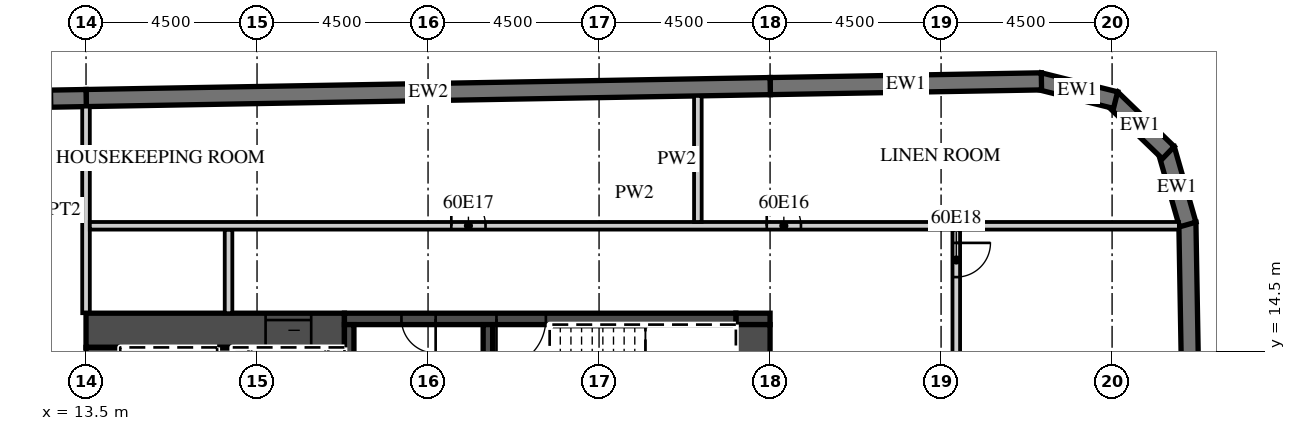
"""IFC4 building model, lengths in metres.
Left out: names, types, materials, properties, quantities, classifications, styles, units other than length and angle.
Written with IfcOpenShell. Run it as: python <this file> out.ifc"""

import sys

from ifc_helpers import new_model, si_unit, direction, frame, frame_2d, origin, place, context, subcontext, project, spatial, polyline, rectangle, outline, extrude, element, fill, save


model = new_model("IFC4")
c1 = context("Model", 3, precision=1e-05, world=origin(), true_north=direction((0.0, 1.0)))
c2 = subcontext(c1, "Body", "Model", "MODEL_VIEW")
j1 = project(units=[si_unit("LENGTHUNIT", "METRE"), si_unit("PLANEANGLEUNIT", "RADIAN")], contexts=[c1])
p1 = place(None, origin())
s1 = spatial("IfcSite", under=j1, at=p1, CompositionType="ELEMENT")
p2 = place(p1, origin())
s2 = spatial("IfcBuilding", under=s1, at=p2, CompositionType="ELEMENT")
p3 = place(p2, frame((0.0, 0.0, 244.1)))
s3 = spatial("IfcBuildingStorey", under=s2, at=p3, CompositionType="ELEMENT", Elevation=244.1)
p4 = place(p3, frame((43.057, -15.103, 0.0), z_axis=(0.0, 0.0, 1.0), x_axis=(-0.017452408953, 0.999847695112, 0.0)))
e1 = element("IfcWall", 1, at=p4, inside=s3, PredefinedType="SOLIDWALL", context=c2, shape_type="SweptSolid", body=[
    extrude(rectangle(XDim=33.0, YDim=0.45, at=frame_2d((16.5, 0.0))), origin(), (0.0, 0.0, 1.0), 3.02),
])
p5 = place(p3, frame((42.49, 17.833, 0.0), z_axis=(0.0, 0.0, 1.0), x_axis=(-0.275546368831, 0.961287781377, 0.0)))
e2 = element("IfcWall", 2, at=p5, inside=s3, PredefinedType="SOLIDWALL", context=c2, shape_type="SweptSolid", body=[
    extrude(outline(polyline([(0.0, -0.225), (2.071, -0.225), (1.95, 0.225), (0.121, 0.225), (0.0, -0.225)])), origin(), (0.0, 0.0, 1.0), 3.02),
])
p6 = place(p3, frame((41.979, 19.724, 0.0), z_axis=(0.0, 0.0, 1.0), x_axis=(-0.719379111448, 0.694617660308, 0.0)))
e3 = element("IfcWall", 3, at=p6, inside=s3, PredefinedType="SOLIDWALL", context=c2, shape_type="SweptSolid", body=[
    extrude(outline(polyline([(0.0, -0.225), (2.071, -0.225), (1.95, 0.225), (0.121, 0.225), (0.0, -0.225)])), origin(), (0.0, 0.0, 1.0), 3.02),
])
p7 = place(p3, frame((40.591, 21.106, 0.0), z_axis=(0.0, 0.0, 1.0), x_axis=(-0.970287979719, 0.241952963225, 0.0)))
e4 = element("IfcWall", 4, at=p7, inside=s3, PredefinedType="SOLIDWALL", context=c2, shape_type="SweptSolid", body=[
    extrude(outline(polyline([(0.0, -0.225), (2.071, -0.225), (1.95, 0.225), (0.121, 0.225), (0.0, -0.225)])), origin(), (0.0, 0.0, 1.0), 3.02),
])
p8 = place(p3, frame((38.641, 21.6, 0.0), z_axis=(0.0, 0.0, 1.0), x_axis=(-0.999847245074, -0.017478172627, 0.0)))
e5 = element("IfcWall", 5, at=p8, inside=s3, PredefinedType="SOLIDWALL", context=c2, shape_type="SweptSolid", body=[
    extrude(rectangle(XDim=7.138, YDim=0.45, at=frame_2d((3.569, 0.0))), origin(), (0.0, 0.0, 1.0), 3.02),
])
p9 = place(p3, frame((31.504, 21.476, 0.0), z_axis=(0.0, 0.0, 1.0), x_axis=(-0.999847677887, -0.017453395744, 0.0)))
e6 = element("IfcWall", 6, at=p9, inside=s3, PredefinedType="SOLIDWALL", context=c2, shape_type="SweptSolid", body=[
    extrude(rectangle(XDim=18.003, YDim=0.45, at=frame_2d((9.001, 0.0))), origin(), (0.0, 0.0, 1.0), 3.02),
])
p10 = place(p3, frame((13.504, 21.161, 0.0), z_axis=(0.0, 0.0, 1.0), x_axis=(-0.999847763257, -0.017448504532, 0.0)))
e7 = element("IfcWall", 7, at=p10, inside=s3, PredefinedType="SOLIDWALL", context=c2, shape_type="SweptSolid", body=[
    extrude(rectangle(XDim=46.859, YDim=0.45, at=frame_2d((23.43, 0.0))), origin(), (0.0, 0.0, 1.0), 3.02),
])
p11 = place(p10, frame((0.9, 0.0, 0.45)))
e8 = element("IfcOpeningElement", 8, at=p11, cuts=e7, PredefinedType="OPENING", context=c2, shape_type="SweptSolid", body=[
    extrude(rectangle(XDim=2.7, YDim=2.25, at=frame_2d((1.35, 1.125))), frame((0.0, 0.235, 0.0), z_axis=(0.0, -1.0, 0.0), x_axis=(1.0, 0.0, 0.0)), (0.0, 0.0, 1.0), 0.47),
])
p12 = place(p10, frame((5.401, 0.0, 0.45)))
e9 = element("IfcOpeningElement", 9, at=p12, cuts=e7, PredefinedType="OPENING", context=c2, shape_type="SweptSolid", body=[
    extrude(rectangle(XDim=2.7, YDim=2.25, at=frame_2d((1.35, 1.125))), frame((0.0, 0.235, 0.0), z_axis=(0.0, -1.0, 0.0), x_axis=(1.0, 0.0, 0.0)), (0.0, 0.0, 1.0), 0.47),
])
p13 = place(p10, frame((9.902, 0.0, 0.45)))
e10 = element("IfcOpeningElement", 10, at=p13, cuts=e7, PredefinedType="OPENING", context=c2, shape_type="SweptSolid", body=[
    extrude(rectangle(XDim=2.7, YDim=2.25, at=frame_2d((1.35, 1.125))), frame((0.0, 0.235, 0.0), z_axis=(0.0, -1.0, 0.0), x_axis=(1.0, 0.0, 0.0)), (0.0, 0.0, 1.0), 0.47),
])
p14 = place(p10, frame((14.402, 0.0, 0.45)))
e11 = element("IfcOpeningElement", 11, at=p14, cuts=e7, PredefinedType="OPENING", context=c2, shape_type="SweptSolid", body=[
    extrude(rectangle(XDim=2.7, YDim=2.25, at=frame_2d((1.35, 1.125))), frame((0.0, 0.235, 0.0), z_axis=(0.0, -1.0, 0.0), x_axis=(1.0, 0.0, 0.0)), (0.0, 0.0, 1.0), 0.47),
])
p15 = place(p10, frame((18.903, 0.0, 0.45)))
e12 = element("IfcOpeningElement", 12, at=p15, cuts=e7, PredefinedType="OPENING", context=c2, shape_type="SweptSolid", body=[
    extrude(rectangle(XDim=2.7, YDim=2.25, at=frame_2d((1.35, 1.125))), frame((0.0, 0.235, 0.0), z_axis=(0.0, -1.0, 0.0), x_axis=(1.0, 0.0, 0.0)), (0.0, 0.0, 1.0), 0.47),
])
p16 = place(p10, frame((23.404, 0.0, 0.45)))
e13 = element("IfcOpeningElement", 13, at=p16, cuts=e7, PredefinedType="OPENING", context=c2, shape_type="SweptSolid", body=[
    extrude(rectangle(XDim=2.7, YDim=2.25, at=frame_2d((1.35, 1.125))), frame((0.0, 0.235, 0.0), z_axis=(0.0, -1.0, 0.0), x_axis=(1.0, 0.0, 0.0)), (0.0, 0.0, 1.0), 0.47),
])
p17 = place(p10, frame((27.904, 0.0, 0.45)))
e14 = element("IfcOpeningElement", 14, at=p17, cuts=e7, PredefinedType="OPENING", context=c2, shape_type="SweptSolid", body=[
    extrude(rectangle(XDim=2.7, YDim=2.25, at=frame_2d((1.35, 1.125))), frame((0.0, 0.235, 0.0), z_axis=(0.0, -1.0, 0.0), x_axis=(1.0, 0.0, 0.0)), (0.0, 0.0, 1.0), 0.47),
])
p18 = place(p10, frame((32.405, 0.0, 0.45)))
e15 = element("IfcOpeningElement", 15, at=p18, cuts=e7, PredefinedType="OPENING", context=c2, shape_type="SweptSolid", body=[
    extrude(rectangle(XDim=2.7, YDim=2.25, at=frame_2d((1.35, 1.125))), frame((0.0, 0.235, 0.0), z_axis=(0.0, -1.0, 0.0), x_axis=(1.0, 0.0, 0.0)), (0.0, 0.0, 1.0), 0.47),
])
p19 = place(p10, frame((36.906, 0.0, 0.45)))
e16 = element("IfcOpeningElement", 16, at=p19, cuts=e7, PredefinedType="OPENING", context=c2, shape_type="SweptSolid", body=[
    extrude(rectangle(XDim=2.7, YDim=2.25, at=frame_2d((1.35, 1.125))), frame((0.0, 0.235, 0.0), z_axis=(0.0, -1.0, 0.0), x_axis=(1.0, 0.0, 0.0)), (0.0, 0.0, 1.0), 0.47),
])
p20 = place(p10, frame((41.406, 0.0, 0.45)))
e17 = element("IfcOpeningElement", 17, at=p20, cuts=e7, PredefinedType="OPENING", context=c2, shape_type="SweptSolid", body=[
    extrude(rectangle(XDim=2.7, YDim=2.25, at=frame_2d((1.35, 1.125))), frame((0.0, 0.235, 0.0), z_axis=(0.0, -1.0, 0.0), x_axis=(1.0, 0.0, 0.0)), (0.0, 0.0, 1.0), 0.47),
])
p21 = place(p3, frame((13.5, 15.5, 0.0), z_axis=(0.0, 0.0, 1.0), x_axis=(0.0, 1.0, 0.0)))
e18 = element("IfcWall", 18, at=p21, inside=s3, PredefinedType="PARTITIONING", context=c2, shape_type="SweptSolid", body=[
    extrude(rectangle(XDim=5.436, YDim=0.2, at=frame_2d((2.718, 0.0))), origin(), (0.0, 0.0, 1.0), 3.02),
])
p22 = place(p3, frame((13.5, 15.05, 0.0), z_axis=(0.0, 0.0, 1.0), x_axis=(1.0, 0.0, 0.0)))
e19 = element("IfcWall", 19, at=p22, inside=s3, PredefinedType="SHEAR", context=c2, shape_type="SweptSolid", body=[
    extrude(rectangle(XDim=6.8, YDim=0.9, at=frame_2d((3.4, 0.0))), origin(), (0.0, 0.0, 1.0), 3.02),
])
p23 = place(p22, frame((4.725, 0.0, 0.0)))
e20 = element("IfcOpeningElement", 20, at=p23, cuts=e19, PredefinedType="OPENING", context=c2, shape_type="SweptSolid", body=[
    extrude(rectangle(XDim=1.2, YDim=2.1, at=frame_2d((0.6, 1.05))), frame((0.0, 0.46, 0.0), z_axis=(0.0, -1.0, 0.0), x_axis=(1.0, 0.0, 0.0)), (0.0, 0.0, 1.0), 0.92),
])
p24 = place(p3, frame((30.6, 15.35, 0.0), z_axis=(0.0, 0.0, 1.0), x_axis=(1.0, 0.0, 0.0)))
e21 = element("IfcWall", 21, at=p24, inside=s3, PredefinedType="SHEAR", context=c2, shape_type="SweptSolid", body=[
    extrude(rectangle(XDim=0.9, YDim=0.3, at=frame_2d((0.45, 0.0))), origin(), (0.0, 0.0, 1.0), 3.02),
])
p25 = place(p3, frame((20.3, 15.35, 0.0), z_axis=(0.0, 0.0, 1.0), x_axis=(1.0, 0.0, 0.0)))
e22 = element("IfcWall", 22, at=p25, inside=s3, PredefinedType="SHEAR", context=c2, shape_type="SweptSolid", body=[
    extrude(rectangle(XDim=10.3, YDim=0.3, at=frame_2d((5.15, 0.0))), origin(), (0.0, 0.0, 1.0), 3.02),
])
p26 = place(p25, frame((4.0, 0.0, 0.0)))
e23 = element("IfcOpeningElement", 23, at=p26, cuts=e22, PredefinedType="OPENING", context=c2, shape_type="SweptSolid", body=[
    extrude(rectangle(XDim=1.3, YDim=2.1, at=frame_2d((0.65, 1.05))), frame((0.0, 0.16, 0.0), z_axis=(0.0, -1.0, 0.0), x_axis=(1.0, 0.0, 0.0)), (0.0, 0.0, 1.0), 0.32),
])
p27 = place(p25, frame((1.5, 0.0, 0.0)))
e24 = element("IfcOpeningElement", 24, at=p27, cuts=e22, PredefinedType="OPENING", context=c2, shape_type="SweptSolid", body=[
    extrude(rectangle(XDim=0.9, YDim=2.1, at=frame_2d((0.45, 1.05))), frame((0.0, 0.16, 0.0), z_axis=(0.0, -1.0, 0.0), x_axis=(1.0, 0.0, 0.0)), (0.0, 0.0, 1.0), 0.32),
])
p28 = place(p3, frame((31.05, 2.4, 0.0), z_axis=(0.0, 0.0, 1.0), x_axis=(0.0, 1.0, 0.0)))
e25 = element("IfcWall", 25, at=p28, inside=s3, PredefinedType="SHEAR", context=c2, shape_type="SweptSolid", body=[
    extrude(rectangle(XDim=12.8, YDim=0.9, at=frame_2d((6.4, 0.0))), origin(), (0.0, 0.0, 1.0), 3.02),
])
p29 = place(p28, frame((0.2, 0.0, 0.0)))
e26 = element("IfcOpeningElement", 26, at=p29, cuts=e25, PredefinedType="OPENING", context=c2, shape_type="SweptSolid", body=[
    extrude(rectangle(XDim=1.1, YDim=2.1, at=frame_2d((0.55, 1.05))), frame((0.0, 0.46, 0.0), z_axis=(0.0, -1.0, 0.0), x_axis=(1.0, 0.0, 0.0)), (0.0, 0.0, 1.0), 0.92),
])
p30 = place(p3, frame((13.95, 2.4, 0.0), z_axis=(0.0, 0.0, 1.0), x_axis=(0.0, 1.0, 0.0)))
e27 = element("IfcWall", 27, at=p30, inside=s3, PredefinedType="SHEAR", context=c2, shape_type="SweptSolid", body=[
    extrude(rectangle(XDim=12.2, YDim=0.9, at=frame_2d((6.1, 0.0))), origin(), (0.0, 0.0, 1.0), 3.02),
])
p31 = place(p3, frame((17.15, 8.8, 0.0), z_axis=(0.0, 0.0, 1.0), x_axis=(0.0, 1.0, 0.0)))
e28 = element("IfcWall", 28, at=p31, inside=s3, PredefinedType="SHEAR", context=c2, shape_type="SweptSolid", body=[
    extrude(rectangle(XDim=5.8, YDim=0.4, at=frame_2d((2.9, 0.0))), origin(), (0.0, 0.0, 1.0), 3.02),
])
for number, where, z_axis, x_axis in (
    (29, (20.425, 11.95, 0.0), (0.0, 0.0, 1.0), (0.0, 1.0, 0.0)),
    (30, (24.075, 11.95, 0.0), (0.0, 0.0, 1.0), (0.0, 1.0, 0.0)),
):
    element("IfcWall", number, at=place(p3, frame(where, z_axis=z_axis, x_axis=x_axis)), inside=s3, PredefinedType="SHEAR", context=c2, shape_type="SweptSolid", body=[
        extrude(rectangle(XDim=3.25, YDim=0.25, at=frame_2d((1.625, 0.0))), origin(), (0.0, 0.0, 1.0), 3.02),
    ])
p32 = place(p3, frame((17.25, 15.5, 0.0), z_axis=(0.0, 0.0, 1.0), x_axis=(0.0, 1.0, 0.0)))
e31 = element("IfcWall", 31, at=p32, inside=s3, PredefinedType="PARTITIONING", context=c2, shape_type="SweptSolid", body=[
    extrude(rectangle(XDim=2.2, YDim=0.2, at=frame_2d((1.1, 0.0))), origin(), (0.0, 0.0, 1.0), 3.02),
])
p33 = place(p3, frame((36.4, 1.75, 0.0), z_axis=(0.0, 0.0, 1.0), x_axis=(0.0, 1.0, 0.0)))
e32 = element("IfcWall", 32, at=p33, inside=s3, PredefinedType="PARTITIONING", context=c2, shape_type="SweptSolid", body=[
    extrude(rectangle(XDim=15.95, YDim=0.2, at=frame_2d((7.975, 0.0))), origin(), (0.0, 0.0, 1.0), 3.02),
])
p34 = place(p33, frame((14.7, 0.0, 0.0)))
e33 = element("IfcOpeningElement", 33, at=p34, cuts=e32, PredefinedType="OPENING", context=c2, shape_type="SweptSolid", body=[
    extrude(rectangle(XDim=0.9, YDim=2.1, at=frame_2d((0.45, 1.05))), frame((0.0, 0.11, 0.0), z_axis=(0.0, -1.0, 0.0), x_axis=(1.0, 0.0, 0.0)), (0.0, 0.0, 1.0), 0.22),
])
p35 = place(p3, frame((13.6, 17.8, 0.0), z_axis=(0.0, 0.0, 1.0), x_axis=(1.0, 0.0, 0.0)))
e34 = element("IfcWall", 34, at=p35, inside=s3, PredefinedType="PARTITIONING", context=c2, shape_type="SweptSolid", body=[
    extrude(rectangle(XDim=28.657, YDim=0.2, at=frame_2d((14.329, 0.0))), origin(), (0.0, 0.0, 1.0), 3.02),
])
p36 = place(p35, frame((17.812, 0.0, 0.0)))
e35 = element("IfcOpeningElement", 35, at=p36, cuts=e34, PredefinedType="OPENING", context=c2, shape_type="SweptSolid", body=[
    extrude(rectangle(XDim=0.9, YDim=2.1, at=frame_2d((0.45, 1.05))), frame((0.0, 0.11, 0.0), z_axis=(0.0, -1.0, 0.0), x_axis=(1.0, 0.0, 0.0)), (0.0, 0.0, 1.0), 0.22),
])
p37 = place(p35, frame((9.512, 0.0, 0.0)))
e36 = element("IfcOpeningElement", 36, at=p37, cuts=e34, PredefinedType="OPENING", context=c2, shape_type="SweptSolid", body=[
    extrude(rectangle(XDim=0.9, YDim=2.1, at=frame_2d((0.45, 1.05))), frame((0.0, 0.11, 0.0), z_axis=(0.0, -1.0, 0.0), x_axis=(1.0, 0.0, 0.0)), (0.0, 0.0, 1.0), 0.22),
])
p38 = place(p3, frame((29.6, 17.9, 0.0), z_axis=(0.0, 0.0, 1.0), x_axis=(0.0, 1.0, 0.0)))
e37 = element("IfcWall", 37, at=p38, inside=s3, PredefinedType="PARTITIONING", context=c2, shape_type="SweptSolid", body=[
    extrude(rectangle(XDim=3.318, YDim=0.2, at=frame_2d((1.659, 0.0))), origin(), (0.0, 0.0, 1.0), 3.02),
])
p39 = place(p11, origin())
e38 = element("IfcWindow", 38, at=p39, inside=s3, PartitioningType="SINGLE_PANEL", PredefinedType="WINDOW", context=c2, shape_type="SweptSolid", body=[
    extrude(rectangle(XDim=2.7, YDim=2.25, at=frame_2d((1.35, 1.125))), frame((0.0, 0.09, 0.0), z_axis=(0.0, -1.0, 0.0), x_axis=(1.0, 0.0, 0.0)), (0.0, 0.0, 1.0), 0.06),
])
fill(e8, e38)
p40 = place(p23, origin())
e39 = element("IfcDoor", 39, at=p40, inside=s3, OperationType="SLIDING_TO_LEFT", PredefinedType="DOOR", context=c2, shape_type="SweptSolid", body=[
    extrude(rectangle(XDim=1.2, YDim=2.1, at=frame_2d((0.6, 1.05))), frame((0.0, 0.025, 0.0), z_axis=(0.0, -1.0, 0.0), x_axis=(1.0, 0.0, 0.0)), (0.0, 0.0, 1.0), 0.05),
])
fill(e20, e39)
p41 = place(p26, origin())
e40 = element("IfcDoor", 40, at=p41, inside=s3, OperationType="SINGLE_SWING_LEFT", PredefinedType="DOOR", context=c2, shape_type="SweptSolid", body=[
    extrude(rectangle(XDim=1.3, YDim=2.1, at=frame_2d((0.65, 1.05))), frame((0.0, 0.025, 0.0), z_axis=(0.0, -1.0, 0.0), x_axis=(1.0, 0.0, 0.0)), (0.0, 0.0, 1.0), 0.05),
])
fill(e23, e40)
p42 = place(p27, origin())
e41 = element("IfcDoor", 41, at=p42, inside=s3, OperationType="SINGLE_SWING_RIGHT", PredefinedType="DOOR", context=c2, shape_type="SweptSolid", body=[
    extrude(rectangle(XDim=0.9, YDim=2.1, at=frame_2d((0.45, 1.05))), frame((0.0, 0.025, 0.0), z_axis=(0.0, -1.0, 0.0), x_axis=(1.0, 0.0, 0.0)), (0.0, 0.0, 1.0), 0.05),
])
fill(e24, e41)
p43 = place(p36, origin())
e42 = element("IfcDoor", 42, at=p43, inside=s3, OperationType="SINGLE_SWING_LEFT", PredefinedType="DOOR", context=c2, shape_type="SweptSolid", body=[
    extrude(rectangle(XDim=0.9, YDim=2.1, at=frame_2d((0.45, 1.05))), frame((0.0, 0.025, 0.0), z_axis=(0.0, -1.0, 0.0), x_axis=(1.0, 0.0, 0.0)), (0.0, 0.0, 1.0), 0.05),
])
fill(e35, e42)
p44 = place(p37, origin())
e43 = element("IfcDoor", 43, at=p44, inside=s3, OperationType="SINGLE_SWING_LEFT", PredefinedType="DOOR", context=c2, shape_type="SweptSolid", body=[
    extrude(rectangle(XDim=0.9, YDim=2.1, at=frame_2d((0.45, 1.05))), frame((0.0, 0.025, 0.0), z_axis=(0.0, -1.0, 0.0), x_axis=(1.0, 0.0, 0.0)), (0.0, 0.0, 1.0), 0.05),
])
fill(e36, e43)
p45 = place(p34, origin())
e44 = element("IfcDoor", 44, at=p45, inside=s3, OperationType="SINGLE_SWING_RIGHT", PredefinedType="DOOR", context=c2, shape_type="SweptSolid", body=[
    extrude(rectangle(XDim=0.9, YDim=2.1, at=frame_2d((0.45, 1.05))), frame((0.0, 0.025, 0.0), z_axis=(0.0, -1.0, 0.0), x_axis=(1.0, 0.0, 0.0)), (0.0, 0.0, 1.0), 0.05),
])
fill(e33, e44)
save(model, sys.argv[1])
